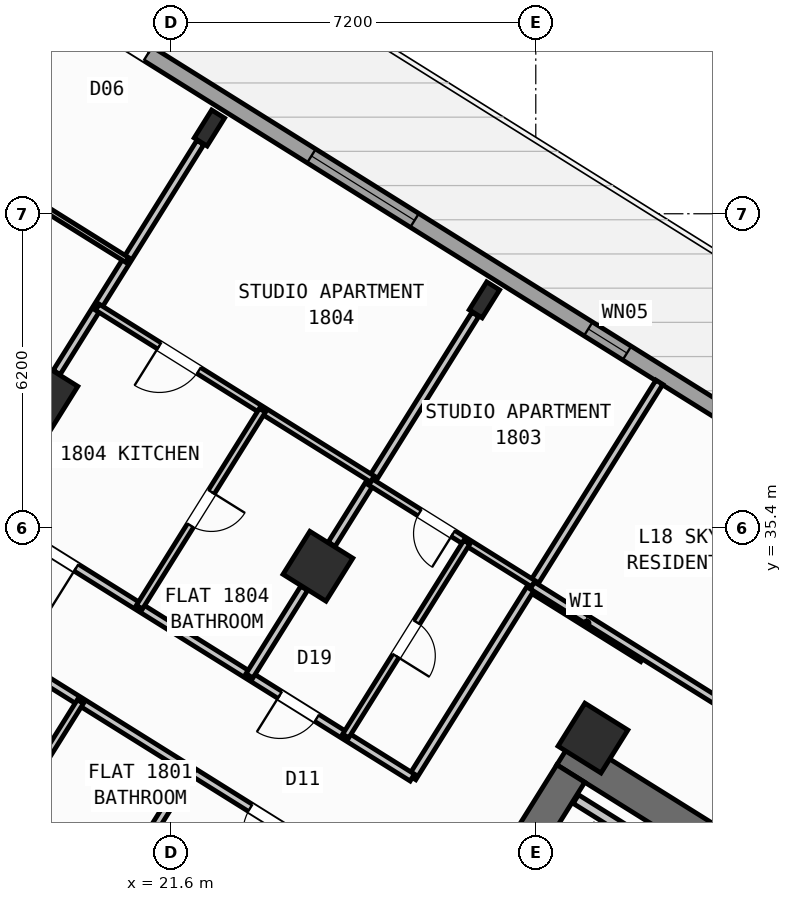
"""IFC4 building model, lengths in metres.
Left out: names, types, materials, properties, quantities, classifications, styles, units other than length and angle.
Written with IfcOpenShell. Run it as: python <this file> out.ifc"""

import sys

from ifc_helpers import new_model, si_unit, direction, frame, frame_2d, origin, origin_2d, place, context, subcontext, project, spatial, rectangle, hollow_rectangle, i_section, extrude, source, transform, mapped, element, fill, save


model = new_model("IFC4")
c1 = context("Model", 3, precision=1e-05, world=origin(), true_north=direction((0.0, 1.0)))
c2 = subcontext(c1, "Body", "Model", "MODEL_VIEW")
j1 = project(units=[si_unit("LENGTHUNIT", "METRE"), si_unit("PLANEANGLEUNIT", "RADIAN")], contexts=[c1])
p1 = place(None, origin())
s1 = spatial("IfcSite", under=j1, at=p1, CompositionType="ELEMENT")
p2 = place(p1, origin())
s2 = spatial("IfcBuilding", under=s1, at=p2, CompositionType="ELEMENT")
p3 = place(p2, frame((0.0, 0.0, 71.7)))
s3 = spatial("IfcBuildingStorey", under=s2, at=p3, CompositionType="ELEMENT", Elevation=71.7)
p4 = place(p3, frame((40.615, 23.983, 0.0), z_axis=(0.0, 0.0, 1.0), x_axis=(-0.848045953968, 0.529922692436, 0.0)))
e1 = element("IfcWall", 1, at=p4, inside=s3, PredefinedType="SHEAR", context=c2, shape_type="SweptSolid", body=[
    extrude(rectangle(XDim=13.24, YDim=0.65, at=frame_2d((6.62, 0.0))), origin(), (0.0, 0.0, 1.0), 4.52),
])
p5 = place(p3, frame((29.491, 30.552, 0.0), z_axis=(0.0, 0.0, 1.0), x_axis=(-0.529893103397, -0.8480644427, 0.0)))
e2 = element("IfcWall", 2, at=p5, inside=s3, PredefinedType="SHEAR", context=c2, shape_type="SweptSolid", body=[
    extrude(rectangle(XDim=3.525, YDim=0.65, at=frame_2d((1.763, 0.0))), origin(), (0.0, 0.0, 1.0), 4.52),
])
m1 = source(origin(), c2, "Body", "SweptSolid", [
    extrude(hollow_rectangle(XDim=1.0, YDim=1.0, WallThickness=0.04, at=origin_2d()), origin(), (0.0, 0.0, 1.0), 4.8),
])
p6 = place(p3, frame((29.928, 31.251, 0.0), z_axis=(0.0, 0.0, 1.0), x_axis=(-0.848048096156, 0.529919264233, 0.0)))
e3 = element("IfcColumn", 3, at=p6, inside=s3, PredefinedType="COLUMN", context=c2, shape_type="MappedRepresentation", body=[
    mapped(m1, transform((0.0, 0.0, 0.0), scale=1.0)),
])
m2 = source(origin(), c2, "Body", "SweptSolid", [
    extrude(i_section(OverallWidth=0.3, OverallDepth=0.65, WebThickness=0.016, FlangeThickness=0.031, at=origin_2d()), origin(), (0.0, 0.0, 1.0), 4.8),
])
p7 = place(p3, frame((27.786, 39.901, 0.0), z_axis=(0.0, 0.0, 1.0), x_axis=(-0.848048096156, 0.529919264233, 0.0)))
e4 = element("IfcColumn", 4, at=p7, inside=s3, PredefinedType="COLUMN", context=c2, shape_type="MappedRepresentation", body=[
    mapped(m2, transform((0.0, 0.0, 0.0), scale=1.0)),
])
p8 = place(p3, frame((24.5, 34.643, 0.0), z_axis=(0.0, 0.0, 1.0), x_axis=(-0.848048096156, 0.529919264233, 0.0)))
e5 = element("IfcColumn", 5, at=p8, inside=s3, PredefinedType="COLUMN", context=c2, shape_type="MappedRepresentation", body=[
    mapped(m1, transform((0.0, 0.0, 0.0), scale=1.0)),
])
p9 = place(p3, frame((22.358, 43.292, 0.0), z_axis=(0.0, 0.0, 1.0), x_axis=(-0.848048096156, 0.529919264233, 0.0)))
e6 = element("IfcColumn", 6, at=p9, inside=s3, PredefinedType="COLUMN", context=c2, shape_type="MappedRepresentation", body=[
    mapped(m2, transform((0.0, 0.0, 0.0), scale=1.0)),
])
p10 = place(p3, frame((19.073, 38.034, 0.0), z_axis=(0.0, 0.0, 1.0), x_axis=(-0.848048096156, 0.529919264233, 0.0)))
e7 = element("IfcColumn", 7, at=p10, inside=s3, PredefinedType="COLUMN", context=c2, shape_type="MappedRepresentation", body=[
    mapped(m1, transform((0.0, 0.0, 0.0), scale=1.0)),
])
p11 = place(p3, frame((17.424, 47.083, 0.0), z_axis=(0.0, 0.0, 1.0), x_axis=(0.848049927979, -0.529916332693, 0.0)))
e8 = element("IfcWall", 8, at=p11, inside=s3, PredefinedType="STANDARD", context=c2, shape_type="SweptSolid", body=[
    extrude(rectangle(XDim=29.223, YDim=0.32, at=frame_2d((14.612, 0.0))), origin(), (0.0, 0.0, 1.0), 4.52),
])
p12 = place(p11, frame((3.339, 0.0, 0.0)))
e9 = element("IfcOpeningElement", 9, at=p12, cuts=e8, PredefinedType="OPENING", context=c2, shape_type="SweptSolid", body=[
    extrude(rectangle(XDim=1.05, YDim=2.15, at=frame_2d((0.525, 1.075))), frame((0.0, 0.17, 0.0), z_axis=(0.0, -1.0, 0.0), x_axis=(1.0, 0.0, 0.0)), (0.0, 0.0, 1.0), 0.34),
])
p13 = place(p11, frame((8.194, 0.0, 0.75)))
e10 = element("IfcOpeningElement", 10, at=p13, cuts=e8, PredefinedType="OPENING", context=c2, shape_type="SweptSolid", body=[
    extrude(rectangle(XDim=2.4, YDim=1.6, at=frame_2d((1.2, 0.8))), frame((0.0, 0.17, 0.0), z_axis=(0.0, -1.0, 0.0), x_axis=(1.0, 0.0, 0.0)), (0.0, 0.0, 1.0), 0.34),
])
p14 = place(p11, frame((22.226, 0.0, 0.85)))
e11 = element("IfcOpeningElement", 11, at=p14, cuts=e8, PredefinedType="OPENING", context=c2, shape_type="SweptSolid", body=[
    extrude(rectangle(XDim=1.8, YDim=1.5, at=frame_2d((0.9, 0.75))), frame((0.0, 0.17, 0.0), z_axis=(0.0, -1.0, 0.0), x_axis=(1.0, 0.0, 0.0)), (0.0, 0.0, 1.0), 0.34),
])
p15 = place(p11, frame((26.934, 0.0, 0.95)))
e12 = element("IfcOpeningElement", 12, at=p15, cuts=e8, PredefinedType="OPENING", context=c2, shape_type="SweptSolid", body=[
    extrude(rectangle(XDim=1.2, YDim=1.4, at=frame_2d((0.6, 0.7))), frame((0.0, 0.17, 0.0), z_axis=(0.0, -1.0, 0.0), x_axis=(1.0, 0.0, 0.0)), (0.0, 0.0, 1.0), 0.34),
])
p16 = place(p11, frame((14.636, 0.0, 1.0)))
e13 = element("IfcOpeningElement", 13, at=p16, cuts=e8, PredefinedType="OPENING", context=c2, shape_type="SweptSolid", body=[
    extrude(rectangle(XDim=0.9, YDim=1.25, at=frame_2d((0.45, 0.625))), frame((0.0, 0.17, 0.0), z_axis=(0.0, -1.0, 0.0), x_axis=(1.0, 0.0, 0.0)), (0.0, 0.0, 1.0), 0.34),
])
p17 = place(p3, frame((33.363, 27.69, 0.0), z_axis=(0.0, 0.0, 1.0), x_axis=(-0.848053806312, 0.529910125964, 0.0)))
e14 = element("IfcWall", 14, at=p17, inside=s3, PredefinedType="STANDARD", context=c2, shape_type="SweptSolid", body=[
    extrude(rectangle(XDim=4.448, YDim=0.2, at=frame_2d((2.224, 0.0))), origin(), (0.0, 0.0, 1.0), 4.51),
])
p18 = place(p3, frame((30.914, 32.829, 0.0), z_axis=(0.0, 0.0, 1.0), x_axis=(-0.848008813643, 0.529982124211, 0.0)))
e15 = element("IfcWall", 15, at=p18, inside=s3, PredefinedType="PARTITIONING", context=c2, shape_type="SweptSolid", body=[
    extrude(rectangle(XDim=2.61, YDim=0.16, at=frame_2d((1.305, 0.0))), origin(), (0.0, 0.0, 1.0), 4.51),
])
p19 = place(p3, frame((31.239, 38.274, 0.0), z_axis=(0.0, 0.0, 1.0), x_axis=(-0.529920220799, -0.848047498427, 0.0)))
e16 = element("IfcWall", 16, at=p19, inside=s3, PredefinedType="PARTITIONING", context=c2, shape_type="SweptSolid", body=[
    extrude(rectangle(XDim=9.2, YDim=0.16, at=frame_2d((4.6, 0.0))), origin(), (0.0, 0.0, 1.0), 4.51),
])
p20 = place(p3, frame((26.363, 30.472, 0.0), z_axis=(0.0, 0.0, 1.0), x_axis=(-0.848052408131, 0.529912363569, 0.0)))
e17 = element("IfcWall", 17, at=p20, inside=s3, PredefinedType="PARTITIONING", context=c2, shape_type="SweptSolid", body=[
    extrude(rectangle(XDim=16.73, YDim=0.16, at=frame_2d((8.365, 0.0))), origin(), (0.0, 0.0, 1.0), 4.51),
])
p21 = place(p20, frame((2.22, 0.0, 0.0)))
e18 = element("IfcOpeningElement", 18, at=p21, cuts=e17, PredefinedType="OPENING", context=c2, shape_type="SweptSolid", body=[
    extrude(rectangle(XDim=0.86, YDim=2.05, at=frame_2d((0.43, 1.025))), frame((0.0, 0.09, 0.0), z_axis=(0.0, -1.0, 0.0), x_axis=(1.0, 0.0, 0.0)), (0.0, 0.0, 1.0), 0.18),
])
p22 = place(p20, frame((7.82, 0.0, 0.0)))
e19 = element("IfcOpeningElement", 19, at=p22, cuts=e17, PredefinedType="OPENING", context=c2, shape_type="SweptSolid", body=[
    extrude(rectangle(XDim=1.0, YDim=2.1, at=frame_2d((0.5, 1.05))), frame((0.0, 0.09, 0.0), z_axis=(0.0, -1.0, 0.0), x_axis=(1.0, 0.0, 0.0)), (0.0, 0.0, 1.0), 0.18),
])
p23 = place(p20, frame((12.95, 0.0, 0.0)))
e20 = element("IfcOpeningElement", 20, at=p23, cuts=e17, PredefinedType="OPENING", context=c2, shape_type="SweptSolid", body=[
    extrude(rectangle(XDim=1.0, YDim=2.1, at=frame_2d((0.5, 1.05))), frame((0.0, 0.09, 0.0), z_axis=(0.0, -1.0, 0.0), x_axis=(1.0, 0.0, 0.0)), (0.0, 0.0, 1.0), 0.18),
])
p24 = place(p3, frame((25.198, 28.606, 0.0), z_axis=(0.0, 0.0, 1.0), x_axis=(-0.848052408131, 0.529912363569, 0.0)))
e21 = element("IfcWall", 21, at=p24, inside=s3, PredefinedType="PARTITIONING", context=c2, shape_type="SweptSolid", body=[
    extrude(rectangle(XDim=16.73, YDim=0.16, at=frame_2d((8.365, 0.0))), origin(), (0.0, 0.0, 1.0), 4.51),
])
p25 = place(p24, frame((1.395, 0.0, 0.0)))
e22 = element("IfcOpeningElement", 22, at=p25, cuts=e21, PredefinedType="OPENING", context=c2, shape_type="SweptSolid", body=[
    extrude(rectangle(XDim=1.0, YDim=2.1, at=frame_2d((0.5, 1.05))), frame((0.0, 0.09, 0.0), z_axis=(0.0, -1.0, 0.0), x_axis=(1.0, 0.0, 0.0)), (0.0, 0.0, 1.0), 0.18),
])
p26 = place(p24, frame((7.82, 0.0, 0.0)))
e23 = element("IfcOpeningElement", 23, at=p26, cuts=e21, PredefinedType="OPENING", context=c2, shape_type="SweptSolid", body=[
    extrude(rectangle(XDim=1.0, YDim=2.1, at=frame_2d((0.5, 1.05))), frame((0.0, 0.09, 0.0), z_axis=(0.0, -1.0, 0.0), x_axis=(1.0, 0.0, 0.0)), (0.0, 0.0, 1.0), 0.18),
])
p27 = place(p24, frame((14.76, 0.0, 0.0)))
e24 = element("IfcOpeningElement", 24, at=p27, cuts=e21, PredefinedType="OPENING", context=c2, shape_type="SweptSolid", body=[
    extrude(rectangle(XDim=1.0, YDim=2.1, at=frame_2d((0.5, 1.05))), frame((0.0, 0.09, 0.0), z_axis=(0.0, -1.0, 0.0), x_axis=(1.0, 0.0, 0.0)), (0.0, 0.0, 1.0), 0.18),
])
p28 = place(p3, frame((21.983, 30.615, 0.0), z_axis=(0.0, 0.0, 1.0), x_axis=(-0.529966635742, -0.848018493313, 0.0)))
e25 = element("IfcWall", 25, at=p28, inside=s3, PredefinedType="PARTITIONING", context=c2, shape_type="SweptSolid", body=[
    extrude(rectangle(XDim=2.038, YDim=0.16, at=frame_2d((1.019, 0.0))), origin(), (0.0, 0.0, 1.0), 3.895),
])
p29 = place(p3, frame((19.556, 26.73, 0.0), z_axis=(0.0, 0.0, 1.0), x_axis=(-0.848049732085, 0.529916646191, 0.0)))
e26 = element("IfcWall", 26, at=p29, inside=s3, PredefinedType="PLUMBINGWALL", context=c2, shape_type="SweptSolid", body=[
    extrude(rectangle(XDim=6.4, YDim=0.14, at=frame_2d((3.2, 0.0))), origin(), (0.0, 0.0, 1.0), 4.51),
])
p30 = place(p29, frame((2.824, 0.0, 0.0)))
e27 = element("IfcOpeningElement", 27, at=p30, cuts=e26, PredefinedType="OPENING", context=c2, shape_type="SweptSolid", body=[
    extrude(rectangle(XDim=0.78, YDim=2.05, at=frame_2d((0.39, 1.025))), frame((0.0, 0.08, 0.0), z_axis=(0.0, -1.0, 0.0), x_axis=(1.0, 0.0, 0.0)), (0.0, 0.0, 1.0), 0.16),
])
p31 = place(p3, frame((19.812, 31.971, 0.0), z_axis=(0.0, 0.0, 1.0), x_axis=(-0.529917480809, -0.848049210561, 0.0)))
e28 = element("IfcWall", 28, at=p31, inside=s3, PredefinedType="PLUMBINGWALL", context=c2, shape_type="SweptSolid", body=[
    extrude(rectangle(XDim=4.58, YDim=0.14, at=frame_2d((2.29, 0.0))), origin(), (0.0, 0.0, 1.0), 4.51),
])
p32 = place(p31, frame((1.9, 0.0, 0.0)))
e29 = element("IfcOpeningElement", 29, at=p32, cuts=e28, PredefinedType="OPENING", context=c2, shape_type="SweptSolid", body=[
    extrude(rectangle(XDim=0.78, YDim=2.05, at=frame_2d((0.39, 1.025))), frame((0.0, 0.08, 0.0), z_axis=(0.0, -1.0, 0.0), x_axis=(1.0, 0.0, 0.0)), (0.0, 0.0, 1.0), 0.16),
])
p33 = place(p3, frame((27.607, 39.615, 0.0), z_axis=(0.0, 0.0, 1.0), x_axis=(-0.529937421401, -0.848036750028, 0.0)))
e30 = element("IfcWall", 30, at=p33, inside=s3, PredefinedType="PARTITIONING", context=c2, shape_type="SweptSolid", body=[
    extrude(rectangle(XDim=5.351, YDim=0.16, at=frame_2d((2.676, 0.0))), origin(), (0.0, 0.0, 1.0), 3.895),
])
p34 = place(p3, frame((24.229, 34.209, 0.0), z_axis=(0.0, 0.0, 1.0), x_axis=(-0.529826648289, -0.84810596199, 0.0)))
e31 = element("IfcWall", 31, at=p34, inside=s3, PredefinedType="PARTITIONING", context=c2, shape_type="SweptSolid", body=[
    extrude(rectangle(XDim=2.038, YDim=0.16, at=frame_2d((1.019, 0.0))), origin(), (0.0, 0.0, 1.0), 3.895),
])
p35 = place(p3, frame((28.753, 34.297, 0.0), z_axis=(0.0, 0.0, 1.0), x_axis=(-0.848059820872, 0.529900500304, 0.0)))
e32 = element("IfcWall", 32, at=p35, inside=s3, PredefinedType="PLUMBINGWALL", context=c2, shape_type="SweptSolid", body=[
    extrude(rectangle(XDim=3.79, YDim=0.14, at=frame_2d((1.895, 0.0))), origin(), (0.0, 0.0, 1.0), 4.51),
])
p36 = place(p35, frame((1.87, 0.0, 0.0)))
e33 = element("IfcOpeningElement", 33, at=p36, cuts=e32, PredefinedType="OPENING", context=c2, shape_type="SweptSolid", body=[
    extrude(rectangle(XDim=0.78, YDim=2.05, at=frame_2d((0.39, 1.025))), frame((0.0, 0.08, 0.0), z_axis=(0.0, -1.0, 0.0), x_axis=(1.0, 0.0, 0.0)), (0.0, 0.0, 1.0), 0.16),
])
p37 = place(p3, frame((27.439, 35.118, 0.0), z_axis=(0.0, 0.0, 1.0), x_axis=(-0.529911350634, -0.84805304107, 0.0)))
e34 = element("IfcWall", 34, at=p37, inside=s3, PredefinedType="PLUMBINGWALL", context=c2, shape_type="SweptSolid", body=[
    extrude(rectangle(XDim=4.51, YDim=0.14, at=frame_2d((2.255, 0.0))), origin(), (0.0, 0.0, 1.0), 4.135),
])
p38 = place(p37, frame((1.865, 0.0, 0.0)))
e35 = element("IfcOpeningElement", 35, at=p38, cuts=e34, PredefinedType="OPENING", context=c2, shape_type="SweptSolid", body=[
    extrude(rectangle(XDim=0.78, YDim=2.05, at=frame_2d((0.39, 1.025))), frame((0.0, 0.08, 0.0), z_axis=(0.0, -1.0, 0.0), x_axis=(1.0, 0.0, 0.0)), (0.0, 0.0, 1.0), 0.16),
])
p39 = place(p3, frame((22.18, 43.006, 0.0), z_axis=(0.0, 0.0, 1.0), x_axis=(-0.529937421401, -0.848036750028, 0.0)))
e36 = element("IfcWall", 36, at=p39, inside=s3, PredefinedType="PARTITIONING", context=c2, shape_type="SweptSolid", body=[
    extrude(rectangle(XDim=5.351, YDim=0.16, at=frame_2d((2.676, 0.0))), origin(), (0.0, 0.0, 1.0), 3.895),
])
p40 = place(p3, frame((25.576, 36.365, 0.0), z_axis=(0.0, 0.0, 1.0), x_axis=(-0.848056163074, 0.529906354247, 0.0)))
e37 = element("IfcWall", 37, at=p40, inside=s3, PredefinedType="PLUMBINGWALL", context=c2, shape_type="SweptSolid", body=[
    extrude(rectangle(XDim=6.4, YDim=0.14, at=frame_2d((3.2, 0.0))), origin(), (0.0, 0.0, 1.0), 4.51),
])
p41 = place(p40, frame((4.04, 0.0, 0.0)))
e38 = element("IfcOpeningElement", 38, at=p41, cuts=e37, PredefinedType="OPENING", context=c2, shape_type="SweptSolid", body=[
    extrude(rectangle(XDim=0.92, YDim=2.08, at=frame_2d((0.46, 1.04))), frame((0.0, 0.08, 0.0), z_axis=(0.0, -1.0, 0.0), x_axis=(1.0, 0.0, 0.0)), (0.0, 0.0, 1.0), 0.16),
])
p42 = place(p3, frame((23.405, 37.721, 0.0), z_axis=(0.0, 0.0, 1.0), x_axis=(-0.529955816375, -0.848025254748, 0.0)))
e39 = element("IfcWall", 39, at=p42, inside=s3, PredefinedType="PLUMBINGWALL", context=c2, shape_type="SweptSolid", body=[
    extrude(rectangle(XDim=4.58, YDim=0.14, at=frame_2d((2.29, 0.0))), origin(), (0.0, 0.0, 1.0), 4.51),
])
p43 = place(p42, frame((1.9, 0.0, 0.0)))
e40 = element("IfcOpeningElement", 40, at=p43, cuts=e39, PredefinedType="OPENING", context=c2, shape_type="SweptSolid", body=[
    extrude(rectangle(XDim=0.78, YDim=2.05, at=frame_2d((0.39, 1.025))), frame((0.0, 0.08, 0.0), z_axis=(0.0, -1.0, 0.0), x_axis=(1.0, 0.0, 0.0)), (0.0, 0.0, 1.0), 0.16),
])
p44 = place(p3, frame((20.733, 40.69, 0.0), z_axis=(0.0, 0.0, 1.0), x_axis=(-0.848048787466, 0.529918157905, 0.0)))
e41 = element("IfcWall", 41, at=p44, inside=s3, PredefinedType="PARTITIONING", context=c2, shape_type="SweptSolid", body=[
    extrude(rectangle(XDim=6.52, YDim=0.11, at=frame_2d((3.26, 0.0))), origin(), (0.0, 0.0, 1.0), 4.51),
])
p45 = place(p44, frame((2.8, 0.0, 0.0)))
e42 = element("IfcOpeningElement", 42, at=p45, cuts=e41, PredefinedType="OPENING", context=c2, shape_type="SweptSolid", body=[
    extrude(rectangle(XDim=0.92, YDim=2.08, at=frame_2d((0.46, 1.04))), frame((0.0, 0.065, 0.0), z_axis=(0.0, -1.0, 0.0), x_axis=(1.0, 0.0, 0.0)), (0.0, 0.0, 1.0), 0.13),
])
p46 = place(p3, frame((41.936, 26.012, 0.0), z_axis=(0.0, 0.0, 1.0), x_axis=(-0.848051154596, 0.529914369676, 0.0)))
e43 = element("IfcWall", 43, at=p46, inside=s3, PredefinedType="PARTITIONING", context=c2, shape_type="SweptSolid", body=[
    extrude(rectangle(XDim=15.57, YDim=0.16, at=frame_2d((7.785, 0.0))), origin(), (0.0, 0.0, 1.0), 4.51),
])
p47 = place(p46, frame((4.1, 0.0, 0.0)))
e44 = element("IfcOpeningElement", 44, at=p47, cuts=e43, PredefinedType="OPENING", context=c2, shape_type="SweptSolid", body=[
    extrude(rectangle(XDim=0.96, YDim=2.08, at=frame_2d((0.48, 1.04))), frame((0.0, 0.09, 0.0), z_axis=(0.0, -1.0, 0.0), x_axis=(1.0, 0.0, 0.0)), (0.0, 0.0, 1.0), 0.18),
])
p48 = place(p46, frame((8.2, 0.0, 0.0)))
e45 = element("IfcOpeningElement", 45, at=p48, cuts=e43, PredefinedType="OPENING", context=c2, shape_type="SweptSolid", body=[
    extrude(rectangle(XDim=1.7, YDim=2.2, at=frame_2d((0.85, 1.1))), frame((0.0, 0.09, 0.0), z_axis=(0.0, -1.0, 0.0), x_axis=(1.0, 0.0, 0.0)), (0.0, 0.0, 1.0), 0.18),
])
m3 = source(origin(), c2, "Body", "SweptSolid", [
    extrude(rectangle(XDim=1.05, YDim=2.15, at=frame_2d((0.525, 1.075))), frame((0.0, 0.025, 0.0), z_axis=(0.0, -1.0, 0.0), x_axis=(1.0, 0.0, 0.0)), (0.0, 0.0, 1.0), 0.05),
])
p49 = place(p12, origin())
e46 = element("IfcDoor", 46, at=p49, inside=s3, OperationType="SINGLE_SWING_RIGHT", PredefinedType="DOOR", context=c2, shape_type="MappedRepresentation", body=[
    mapped(m3, transform((0.0, 0.0, 0.0), scale=1.0)),
])
fill(e9, e46)
m4 = source(origin(), c2, "Body", "SweptSolid", [
    extrude(rectangle(XDim=2.4, YDim=1.6, at=frame_2d((1.2, 0.8))), frame((0.0, 0.03, 0.0), z_axis=(0.0, -1.0, 0.0), x_axis=(1.0, 0.0, 0.0)), (0.0, 0.0, 1.0), 0.06),
])
p50 = place(p13, origin())
e47 = element("IfcWindow", 47, at=p50, inside=s3, PartitioningType="SINGLE_PANEL", PredefinedType="WINDOW", context=c2, shape_type="MappedRepresentation", body=[
    mapped(m4, transform((0.0, 0.0, 0.0), scale=1.0)),
])
fill(e10, e47)
m5 = source(origin(), c2, "Body", "SweptSolid", [
    extrude(rectangle(XDim=0.9, YDim=1.25, at=frame_2d((0.45, 0.625))), frame((0.0, 0.03, 0.0), z_axis=(0.0, -1.0, 0.0), x_axis=(1.0, 0.0, 0.0)), (0.0, 0.0, 1.0), 0.06),
])
p51 = place(p16, origin())
e48 = element("IfcWindow", 48, at=p51, inside=s3, PartitioningType="SINGLE_PANEL", PredefinedType="WINDOW", context=c2, shape_type="MappedRepresentation", body=[
    mapped(m5, transform((0.0, 0.0, 0.0), scale=1.0)),
])
fill(e13, e48)
m6 = source(origin(), c2, "Body", "SweptSolid", [
    extrude(rectangle(XDim=1.0, YDim=2.1, at=frame_2d((0.5, 1.05))), frame((0.0, 0.025, 0.0), z_axis=(0.0, -1.0, 0.0), x_axis=(1.0, 0.0, 0.0)), (0.0, 0.0, 1.0), 0.05),
])
p52 = place(p25, origin())
e49 = element("IfcDoor", 49, at=p52, inside=s3, OperationType="SINGLE_SWING_LEFT", PredefinedType="DOOR", context=c2, shape_type="MappedRepresentation", body=[
    mapped(m6, transform((0.0, 0.0, 0.0), scale=1.0)),
])
fill(e22, e49)
m7 = source(origin(), c2, "Body", "SweptSolid", [
    extrude(rectangle(XDim=0.86, YDim=2.05, at=frame_2d((0.43, 1.025))), frame((0.0, 0.025, 0.0), z_axis=(0.0, -1.0, 0.0), x_axis=(1.0, 0.0, 0.0)), (0.0, 0.0, 1.0), 0.05),
])
p53 = place(p21, origin())
e50 = element("IfcDoor", 50, at=p53, inside=s3, OperationType="SINGLE_SWING_RIGHT", PredefinedType="DOOR", context=c2, shape_type="MappedRepresentation", body=[
    mapped(m7, transform((0.0, 0.0, 0.0), scale=1.0)),
])
fill(e18, e50)
m8 = source(origin(), c2, "Body", "SweptSolid", [
    extrude(rectangle(XDim=0.78, YDim=2.05, at=frame_2d((0.39, 1.025))), frame((0.0, 0.025, 0.0), z_axis=(0.0, -1.0, 0.0), x_axis=(1.0, 0.0, 0.0)), (0.0, 0.0, 1.0), 0.05),
])
p54 = place(p36, origin())
e51 = element("IfcDoor", 51, at=p54, inside=s3, OperationType="SINGLE_SWING_LEFT", PredefinedType="DOOR", context=c2, shape_type="MappedRepresentation", body=[
    mapped(m8, transform((0.0, 0.0, 0.0), scale=1.0)),
])
fill(e33, e51)
p55 = place(p38, origin())
e52 = element("IfcDoor", 52, at=p55, inside=s3, OperationType="SINGLE_SWING_RIGHT", PredefinedType="DOOR", context=c2, shape_type="MappedRepresentation", body=[
    mapped(m8, transform((0.0, 0.0, 0.0), scale=1.0)),
])
fill(e35, e52)
p56 = place(p22, origin())
e53 = element("IfcDoor", 53, at=p56, inside=s3, OperationType="SINGLE_SWING_LEFT", PredefinedType="DOOR", context=c2, shape_type="MappedRepresentation", body=[
    mapped(m6, transform((0.0, 0.0, 0.0), scale=1.0)),
])
fill(e19, e53)
m9 = source(origin(), c2, "Body", "SweptSolid", [
    extrude(rectangle(XDim=0.92, YDim=2.08, at=frame_2d((0.46, 1.04))), frame((0.0, 0.025, 0.0), z_axis=(0.0, -1.0, 0.0), x_axis=(1.0, 0.0, 0.0)), (0.0, 0.0, 1.0), 0.05),
])
p57 = place(p41, origin())
e54 = element("IfcDoor", 54, at=p57, inside=s3, OperationType="SINGLE_SWING_RIGHT", PredefinedType="DOOR", context=c2, shape_type="MappedRepresentation", body=[
    mapped(m9, transform((0.0, 0.0, 0.0), scale=1.0)),
])
fill(e38, e54)
p58 = place(p43, origin())
e55 = element("IfcDoor", 55, at=p58, inside=s3, OperationType="SINGLE_SWING_LEFT", PredefinedType="DOOR", context=c2, shape_type="MappedRepresentation", body=[
    mapped(m8, transform((0.0, 0.0, 0.0), scale=1.0)),
])
fill(e40, e55)
save(model, sys.argv[1])
